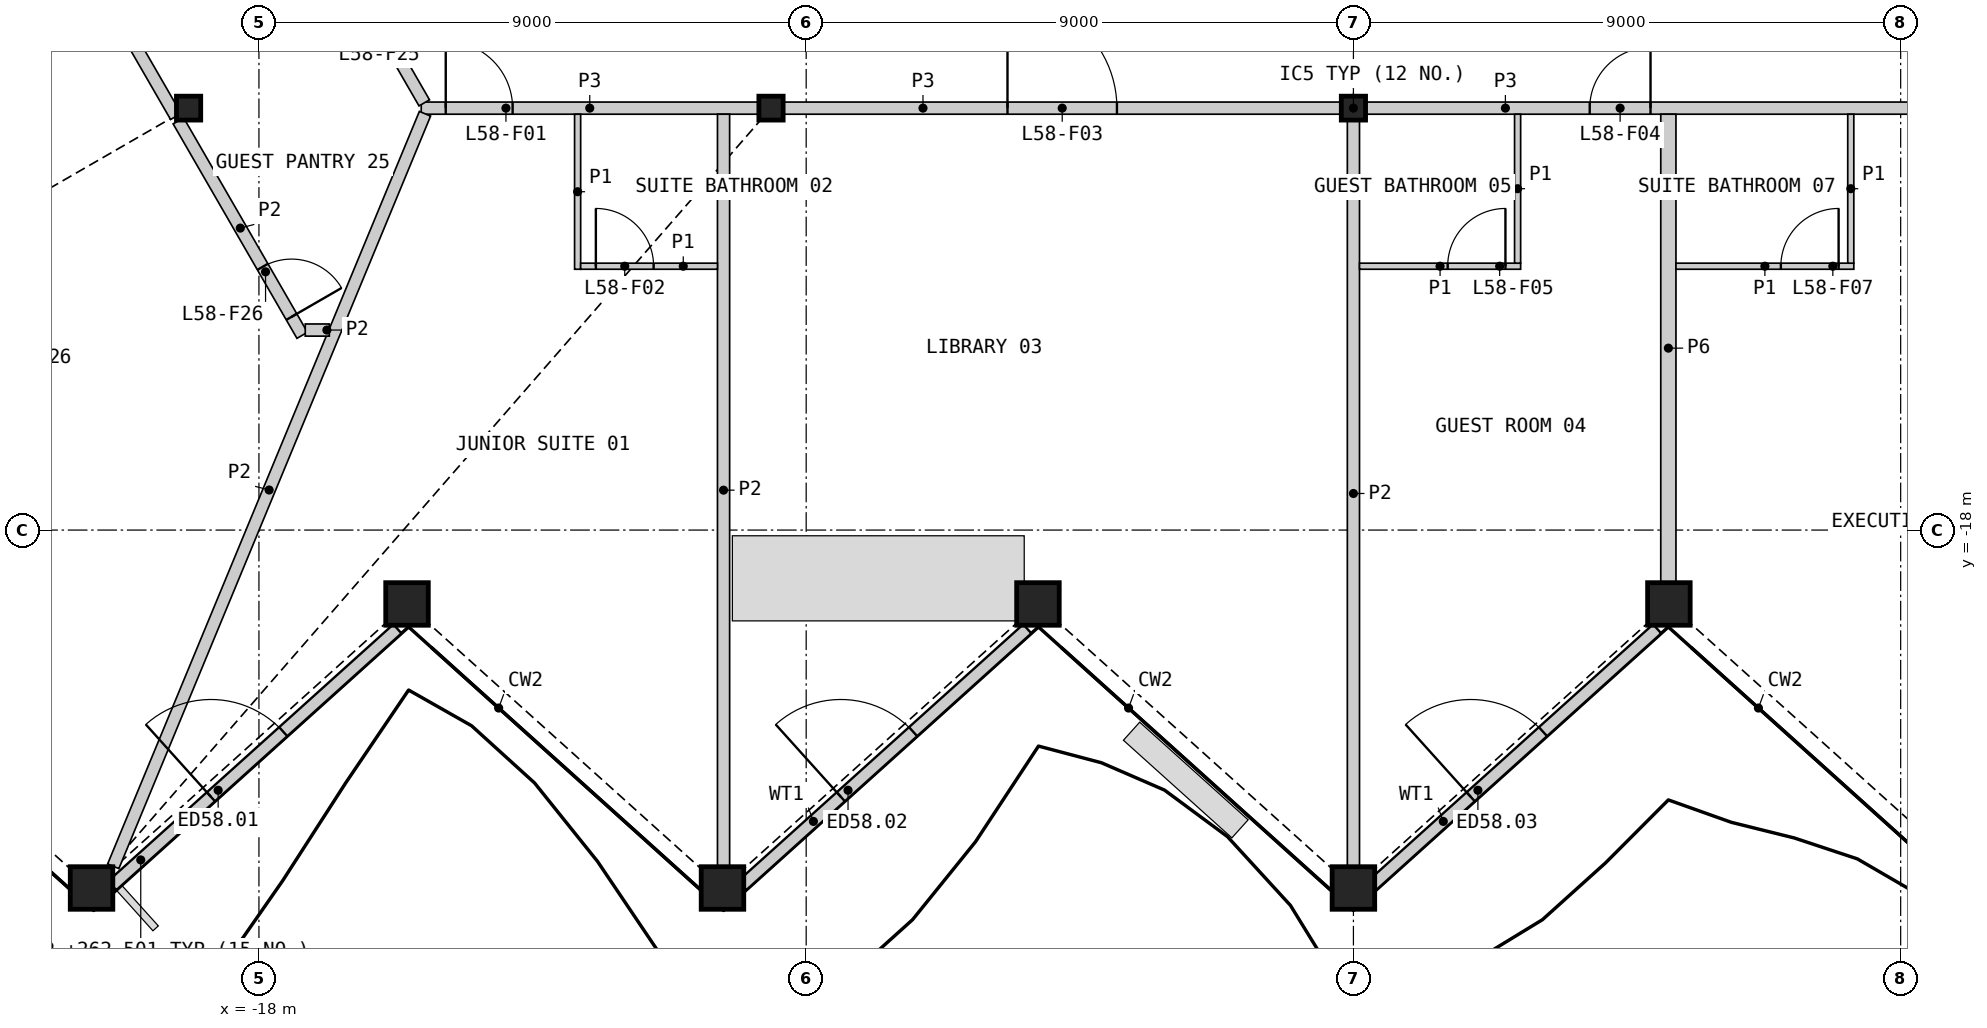
"""IFC4 building model, lengths in metres.
Left out: names, types, materials, properties, quantities, classifications, styles, units other than length and angle.
Written with IfcOpenShell. Run it as: python <this file> out.ifc"""

import sys

from ifc_helpers import new_model, si_unit, direction, frame, frame_2d, origin, origin_2d, place, context, subcontext, project, spatial, rectangle, hollow_rectangle, i_section, extrude, element, fill, save


model = new_model("IFC4")
c1 = context("Model", 3, precision=1e-05, world=origin(), true_north=direction((0.0, 1.0)))
c2 = subcontext(c1, "Body", "Model", "MODEL_VIEW")
j1 = project(units=[si_unit("LENGTHUNIT", "METRE"), si_unit("PLANEANGLEUNIT", "RADIAN")], contexts=[c1])
p1 = place(None, origin())
s1 = spatial("IfcSite", under=j1, at=p1, CompositionType="ELEMENT")
p2 = place(p1, origin())
s2 = spatial("IfcBuilding", under=s1, at=p2, CompositionType="ELEMENT")
p3 = place(p2, frame((0.0, 0.0, 259.8)))
s3 = spatial("IfcBuildingStorey", under=s2, at=p3, CompositionType="ELEMENT", Elevation=259.8)
for number, where, z_axis, x_axis in (
    (1, (-20.753, -23.887, 0.0), (0.0, 0.0, 1.0), (1.0, 0.0, 0.0)),
    (2, (-15.565, -19.215, 0.0), (0.0, 0.0, 1.0), (1.0, 0.0, 0.0)),
    (3, (-10.376, -23.887, 0.0), (0.0, 0.0, 1.0), (1.0, 0.0, 0.0)),
    (4, (-5.188, -19.215, 0.0), (0.0, 0.0, 1.0), (1.0, 0.0, 0.0)),
    (5, (0.0, -23.887, 0.0), (0.0, 0.0, 1.0), (1.0, 0.0, 0.0)),
    (6, (5.188, -19.215, 0.0), (0.0, 0.0, 1.0), (1.0, 0.0, 0.0)),
):
    element("IfcColumn", number, at=place(p3, frame(where, z_axis=z_axis, x_axis=x_axis)), inside=s3, PredefinedType="COLUMN", context=c2, shape_type="SweptSolid", body=[
        extrude(hollow_rectangle(XDim=0.7, YDim=0.7, WallThickness=0.045, at=origin_2d()), origin(), (0.0, 0.0, 1.0), 3.6),
    ])
for number, where, z_axis, x_axis in (
    (7, (-19.157, -11.06, 0.0), (0.0, 0.0, 1.0), (1.0, 0.0, 0.0)),
    (8, (-9.578, -11.06, 0.0), (0.0, 0.0, 1.0), (1.0, 0.0, 0.0)),
    (9, (0.0, -11.06, 0.0), (0.0, 0.0, 1.0), (1.0, 0.0, 0.0)),
):
    element("IfcColumn", number, at=place(p3, frame(where, z_axis=z_axis, x_axis=x_axis)), inside=s3, PredefinedType="COLUMN", context=c2, shape_type="SweptSolid", body=[
        extrude(i_section(OverallWidth=0.399, OverallDepth=0.393, WebThickness=0.023, FlangeThickness=0.037, at=origin_2d()), origin(), (0.0, 0.0, 1.0), 3.6),
    ])
p4 = place(p3, frame((-20.413, -23.848, 0.0), z_axis=(0.0, 0.0, 1.0), x_axis=(0.74314024121, 0.669135697668, 0.0)))
e10 = element("IfcWall", 10, at=p4, inside=s3, PredefinedType="SOLIDWALL", context=c2, shape_type="SweptSolid", body=[
    extrude(rectangle(XDim=6.311, YDim=0.2, at=frame_2d((3.156, 0.0))), origin(), (0.0, 0.0, 1.0), 2.701),
])
p5 = place(p4, frame((2.184, 0.0, 0.0)))
e11 = element("IfcOpeningElement", 11, at=p5, cuts=e10, PredefinedType="OPENING", context=c2, shape_type="SweptSolid", body=[
    extrude(rectangle(XDim=1.6, YDim=2.4, at=frame_2d((0.8, 1.2))), frame((0.0, 0.11, 0.0), z_axis=(0.0, -1.0, 0.0), x_axis=(1.0, 0.0, 0.0)), (0.0, 0.0, 1.0), 0.22),
])
p6 = place(p3, frame((-10.054, -23.848, 0.0), z_axis=(0.0, 0.0, 1.0), x_axis=(0.74314024121, 0.669135697668, 0.0)))
e12 = element("IfcWall", 12, at=p6, inside=s3, PredefinedType="SOLIDWALL", context=c2, shape_type="SweptSolid", body=[
    extrude(rectangle(XDim=6.311, YDim=0.2, at=frame_2d((3.156, 0.0))), origin(), (0.0, 0.0, 1.0), 2.701),
])
p7 = place(p6, frame((2.184, 0.0, 0.0)))
e13 = element("IfcOpeningElement", 13, at=p7, cuts=e12, PredefinedType="OPENING", context=c2, shape_type="SweptSolid", body=[
    extrude(rectangle(XDim=1.6, YDim=2.4, at=frame_2d((0.8, 1.2))), frame((0.0, 0.11, 0.0), z_axis=(0.0, -1.0, 0.0), x_axis=(1.0, 0.0, 0.0)), (0.0, 0.0, 1.0), 0.22),
])
p8 = place(p3, frame((0.305, -23.848, 0.0), z_axis=(0.0, 0.0, 1.0), x_axis=(0.74314024121, 0.669135697668, 0.0)))
e14 = element("IfcWall", 14, at=p8, inside=s3, PredefinedType="SOLIDWALL", context=c2, shape_type="SweptSolid", body=[
    extrude(rectangle(XDim=6.311, YDim=0.2, at=frame_2d((3.156, 0.0))), origin(), (0.0, 0.0, 1.0), 2.701),
])
p9 = place(p8, frame((2.184, 0.0, 0.0)))
e15 = element("IfcOpeningElement", 15, at=p9, cuts=e14, PredefinedType="OPENING", context=c2, shape_type="SweptSolid", body=[
    extrude(rectangle(XDim=1.6, YDim=2.4, at=frame_2d((0.8, 1.2))), frame((0.0, 0.11, 0.0), z_axis=(0.0, -1.0, 0.0), x_axis=(1.0, 0.0, 0.0)), (0.0, 0.0, 1.0), 0.22),
])
p10 = place(p3, frame((-9.369, -11.06, 0.0), z_axis=(0.0, 0.0, 1.0), x_axis=(1.0, 0.0, 0.0)))
e16 = element("IfcWall", 16, at=p10, inside=s3, PredefinedType="PARTITIONING", context=c2, shape_type="SweptSolid", body=[
    extrude(rectangle(XDim=9.159, YDim=0.2, at=frame_2d((4.58, 0.0))), origin(), (0.0, 0.0, 1.0), 3.25),
])
p11 = place(p10, frame((3.68, 0.0, 0.0)))
e17 = element("IfcOpeningElement", 17, at=p11, cuts=e16, PredefinedType="OPENING", context=c2, shape_type="SweptSolid", body=[
    extrude(rectangle(XDim=1.8, YDim=2.1, at=frame_2d((0.9, 1.05))), frame((0.0, 0.11, 0.0), z_axis=(0.0, -1.0, 0.0), x_axis=(1.0, 0.0, 0.0)), (0.0, 0.0, 1.0), 0.22),
])
p12 = place(p3, frame((0.209, -11.06, 0.0), z_axis=(0.0, 0.0, 1.0), x_axis=(1.0, 0.0, 0.0)))
e18 = element("IfcWall", 18, at=p12, inside=s3, PredefinedType="PARTITIONING", context=c2, shape_type="SweptSolid", body=[
    extrude(rectangle(XDim=9.159, YDim=0.2, at=frame_2d((4.58, 0.0))), origin(), (0.0, 0.0, 1.0), 3.25),
])
p13 = place(p12, frame((3.677, 0.0, 0.0)))
e19 = element("IfcOpeningElement", 19, at=p13, cuts=e18, PredefinedType="OPENING", context=c2, shape_type="SweptSolid", body=[
    extrude(rectangle(XDim=1.0, YDim=2.1, at=frame_2d((0.5, 1.05))), frame((0.0, 0.11, 0.0), z_axis=(0.0, -1.0, 0.0), x_axis=(1.0, 0.0, 0.0)), (0.0, 0.0, 1.0), 0.22),
])
p14 = place(p3, frame((5.179, -18.855, 0.0), z_axis=(0.0, 0.0, 1.0), x_axis=(0.0, 1.0, 0.0)))
e20 = element("IfcWall", 20, at=p14, inside=s3, PredefinedType="PARTITIONING", context=c2, shape_type="SweptSolid", body=[
    extrude(rectangle(XDim=7.695, YDim=0.25, at=frame_2d((3.848, 0.0))), origin(), (0.0, 0.0, 1.0), 2.404),
])
p15 = place(p3, frame((-15.331, -11.06, 0.0), z_axis=(0.0, 0.0, 1.0), x_axis=(1.0, 0.0, 0.0)))
e21 = element("IfcWall", 21, at=p15, inside=s3, PredefinedType="PARTITIONING", context=c2, shape_type="SweptSolid", body=[
    extrude(rectangle(XDim=5.543, YDim=0.2, at=frame_2d((2.771, 0.0))), origin(), (0.0, 0.0, 1.0), 3.25),
])
p16 = place(p15, frame((0.403, 0.0, 0.0)))
e22 = element("IfcOpeningElement", 22, at=p16, cuts=e21, PredefinedType="OPENING", context=c2, shape_type="SweptSolid", body=[
    extrude(rectangle(XDim=1.1, YDim=2.1, at=frame_2d((0.55, 1.05))), frame((0.0, 0.11, 0.0), z_axis=(0.0, -1.0, 0.0), x_axis=(1.0, 0.0, 0.0)), (0.0, 0.0, 1.0), 0.22),
])
p17 = place(p3, frame((-17.144, -7.747, 0.0), z_axis=(0.0, 0.0, 1.0), x_axis=(0.499958791762, -0.866049194065, 0.0)))
e23 = element("IfcWall", 23, at=p17, inside=s3, PredefinedType="PARTITIONING", context=c2, shape_type="SweptSolid", body=[
    extrude(rectangle(XDim=3.726, YDim=0.2, at=frame_2d((1.863, 0.0))), origin(), (0.0, 0.0, 1.0), 3.25),
])
p18 = place(p17, frame((1.388, 0.0, 0.0)))
e24 = element("IfcOpeningElement", 24, at=p18, cuts=e23, PredefinedType="OPENING", context=c2, shape_type="SweptSolid", body=[
    extrude(rectangle(XDim=0.95, YDim=2.1, at=frame_2d((0.475, 1.05))), frame((0.0, 0.11, 0.0), z_axis=(0.0, -1.0, 0.0), x_axis=(1.0, 0.0, 0.0)), (0.0, 0.0, 1.0), 0.22),
])
p19 = place(p3, frame((-20.396, -23.53, 0.0), z_axis=(0.0, 0.0, 1.0), x_axis=(0.382692998932, 0.923875569851, 0.0)))
e25 = element("IfcWall", 25, at=p19, inside=s3, PredefinedType="PARTITIONING", context=c2, shape_type="SweptSolid", body=[
    extrude(rectangle(XDim=13.397, YDim=0.2, at=frame_2d((6.698, 0.0))), origin(), (0.0, 0.0, 1.0), 2.404),
])
p20 = place(p3, frame((-10.359, -23.527, 0.0), z_axis=(0.0, 0.0, 1.0), x_axis=(0.0, 1.0, 0.0)))
e26 = element("IfcWall", 26, at=p20, inside=s3, PredefinedType="PARTITIONING", context=c2, shape_type="SweptSolid", body=[
    extrude(rectangle(XDim=12.366, YDim=0.2, at=frame_2d((6.183, 0.0))), origin(), (0.0, 0.0, 1.0), 2.404),
])
p21 = place(p3, frame((0.0, -23.527, 0.0), z_axis=(0.0, 0.0, 1.0), x_axis=(0.0, 1.0, 0.0)))
e27 = element("IfcWall", 27, at=p21, inside=s3, PredefinedType="PARTITIONING", context=c2, shape_type="SweptSolid", body=[
    extrude(rectangle(XDim=12.257, YDim=0.2, at=frame_2d((6.128, 0.0))), origin(), (0.0, 0.0, 1.0), 2.404),
])
p22 = place(p3, frame((-21.458, -7.574, 0.0), z_axis=(0.0, 0.0, 1.0), x_axis=(0.499973304129, -0.866040816104, 0.0)))
e28 = element("IfcWall", 28, at=p22, inside=s3, PredefinedType="PARTITIONING", context=c2, shape_type="SweptSolid", body=[
    extrude(rectangle(XDim=4.184, YDim=0.2, at=frame_2d((2.092, 0.0))), origin(), (0.0, 0.0, 1.0), 2.404),
])
p23 = place(p3, frame((-19.325, -11.27, 0.0), z_axis=(0.0, 0.0, 1.0), x_axis=(0.500000928893, -0.866024867487, 0.0)))
e29 = element("IfcWall", 29, at=p23, inside=s3, PredefinedType="PARTITIONING", context=c2, shape_type="SweptSolid", body=[
    extrude(rectangle(XDim=4.073, YDim=0.2, at=frame_2d((2.036, 0.0))), origin(), (0.0, 0.0, 1.0), 2.404),
])
p24 = place(p23, frame((2.772, 0.0, 0.0)))
e30 = element("IfcOpeningElement", 30, at=p24, cuts=e29, PredefinedType="OPENING", context=c2, shape_type="SweptSolid", body=[
    extrude(rectangle(XDim=0.95, YDim=2.1, at=frame_2d((0.475, 1.05))), frame((0.0, 0.11, 0.0), z_axis=(0.0, -1.0, 0.0), x_axis=(1.0, 0.0, 0.0)), (0.0, 0.0, 1.0), 0.22),
])
p25 = place(p3, frame((-17.238, -14.71, 0.0), z_axis=(0.0, 0.0, 1.0), x_axis=(1.0, 0.0, 0.0)))
e31 = element("IfcWall", 31, at=p25, inside=s3, PredefinedType="PARTITIONING", context=c2, shape_type="SweptSolid", body=[
    extrude(rectangle(XDim=0.396, YDim=0.2, at=frame_2d((0.198, 0.0))), origin(), (0.0, 0.0, 1.0), 2.404),
])
p26 = place(p3, frame((5.304, -13.66, 0.0), z_axis=(0.0, 0.0, 1.0), x_axis=(1.0, 0.0, 0.0)))
e32 = element("IfcWall", 32, at=p26, inside=s3, PredefinedType="PARTITIONING", context=c2, shape_type="SweptSolid", body=[
    extrude(rectangle(XDim=2.925, YDim=0.1, at=frame_2d((1.462, 0.0))), origin(), (0.0, 0.0, 1.0), 2.404),
])
p27 = place(p26, frame((1.725, 0.0, 0.0)))
e33 = element("IfcOpeningElement", 33, at=p27, cuts=e32, PredefinedType="OPENING", context=c2, shape_type="SweptSolid", body=[
    extrude(rectangle(XDim=0.95, YDim=2.1, at=frame_2d((0.475, 1.05))), frame((0.0, 0.06, 0.0), z_axis=(0.0, -1.0, 0.0), x_axis=(1.0, 0.0, 0.0)), (0.0, 0.0, 1.0), 0.12),
])
p28 = place(p3, frame((0.1, -13.66, 0.0), z_axis=(0.0, 0.0, 1.0), x_axis=(1.0, 0.0, 0.0)))
e34 = element("IfcWall", 34, at=p28, inside=s3, PredefinedType="PARTITIONING", context=c2, shape_type="SweptSolid", body=[
    extrude(rectangle(XDim=2.65, YDim=0.1, at=frame_2d((1.325, 0.0))), origin(), (0.0, 0.0, 1.0), 2.404),
])
p29 = place(p28, frame((1.45, 0.0, 0.0)))
e35 = element("IfcOpeningElement", 35, at=p29, cuts=e34, PredefinedType="OPENING", context=c2, shape_type="SweptSolid", body=[
    extrude(rectangle(XDim=0.95, YDim=2.1, at=frame_2d((0.475, 1.05))), frame((0.0, 0.06, 0.0), z_axis=(0.0, -1.0, 0.0), x_axis=(1.0, 0.0, 0.0)), (0.0, 0.0, 1.0), 0.12),
])
p30 = place(p3, frame((-12.759, -13.71, 0.0), z_axis=(0.0, 0.0, 1.0), x_axis=(0.0, 1.0, 0.0)))
e36 = element("IfcWall", 36, at=p30, inside=s3, PredefinedType="PARTITIONING", context=c2, shape_type="SweptSolid", body=[
    extrude(rectangle(XDim=2.55, YDim=0.1, at=frame_2d((1.275, 0.0))), origin(), (0.0, 0.0, 1.0), 2.404),
])
for number, where, z_axis, x_axis in (
    (37, (2.7, -13.61, 0.0), (0.0, 0.0, 1.0), (0.0, 1.0, 0.0)),
    (38, (8.179, -13.61, 0.0), (0.0, 0.0, 1.0), (0.0, 1.0, 0.0)),
):
    element("IfcWall", number, at=place(p3, frame(where, z_axis=z_axis, x_axis=x_axis)), inside=s3, PredefinedType="PARTITIONING", context=c2, shape_type="SweptSolid", body=[
        extrude(rectangle(XDim=2.45, YDim=0.1, at=frame_2d((1.225, 0.0))), origin(), (0.0, 0.0, 1.0), 2.404),
    ])
p31 = place(p3, frame((-12.709, -13.66, 0.0), z_axis=(0.0, 0.0, 1.0), x_axis=(1.0, 0.0, 0.0)))
e39 = element("IfcWall", 39, at=p31, inside=s3, PredefinedType="PARTITIONING", context=c2, shape_type="SweptSolid", body=[
    extrude(rectangle(XDim=2.25, YDim=0.1, at=frame_2d((1.125, 0.0))), origin(), (0.0, 0.0, 1.0), 2.404),
])
p32 = place(p31, frame((0.25, 0.0, 0.0)))
e40 = element("IfcOpeningElement", 40, at=p32, cuts=e39, PredefinedType="OPENING", context=c2, shape_type="SweptSolid", body=[
    extrude(rectangle(XDim=0.95, YDim=2.1, at=frame_2d((0.475, 1.05))), frame((0.0, 0.06, 0.0), z_axis=(0.0, -1.0, 0.0), x_axis=(1.0, 0.0, 0.0)), (0.0, 0.0, 1.0), 0.12),
])
p33 = place(p5, origin())
e41 = element("IfcDoor", 41, at=p33, inside=s3, OperationType="DOUBLE_DOOR_SINGLE_SWING", PredefinedType="DOOR", context=c2, shape_type="SweptSolid", body=[
    extrude(rectangle(XDim=1.6, YDim=2.4, at=frame_2d((0.8, 1.2))), frame((0.0, 0.025, 0.0), z_axis=(0.0, -1.0, 0.0), x_axis=(1.0, 0.0, 0.0)), (0.0, 0.0, 1.0), 0.05),
])
fill(e11, e41)
p34 = place(p7, origin())
e42 = element("IfcDoor", 42, at=p34, inside=s3, OperationType="DOUBLE_DOOR_SINGLE_SWING", PredefinedType="DOOR", context=c2, shape_type="SweptSolid", body=[
    extrude(rectangle(XDim=1.6, YDim=2.4, at=frame_2d((0.8, 1.2))), frame((0.0, 0.025, 0.0), z_axis=(0.0, -1.0, 0.0), x_axis=(1.0, 0.0, 0.0)), (0.0, 0.0, 1.0), 0.05),
])
fill(e13, e42)
p35 = place(p9, origin())
e43 = element("IfcDoor", 43, at=p35, inside=s3, OperationType="DOUBLE_DOOR_SINGLE_SWING", PredefinedType="DOOR", context=c2, shape_type="SweptSolid", body=[
    extrude(rectangle(XDim=1.6, YDim=2.4, at=frame_2d((0.8, 1.2))), frame((0.0, 0.025, 0.0), z_axis=(0.0, -1.0, 0.0), x_axis=(1.0, 0.0, 0.0)), (0.0, 0.0, 1.0), 0.05),
])
fill(e15, e43)
p36 = place(p16, origin())
e44 = element("IfcDoor", 44, at=p36, inside=s3, OperationType="SINGLE_SWING_LEFT", PredefinedType="DOOR", context=c2, shape_type="SweptSolid", body=[
    extrude(rectangle(XDim=1.1, YDim=2.1, at=frame_2d((0.55, 1.05))), frame((0.0, 0.025, 0.0), z_axis=(0.0, -1.0, 0.0), x_axis=(1.0, 0.0, 0.0)), (0.0, 0.0, 1.0), 0.05),
])
fill(e22, e44)
p37 = place(p32, origin())
e45 = element("IfcDoor", 45, at=p37, inside=s3, OperationType="SINGLE_SWING_LEFT", PredefinedType="DOOR", context=c2, shape_type="SweptSolid", body=[
    extrude(rectangle(XDim=0.95, YDim=2.1, at=frame_2d((0.475, 1.05))), frame((0.0, 0.025, 0.0), z_axis=(0.0, -1.0, 0.0), x_axis=(1.0, 0.0, 0.0)), (0.0, 0.0, 1.0), 0.05),
])
fill(e40, e45)
p38 = place(p11, origin())
e46 = element("IfcDoor", 46, at=p38, inside=s3, OperationType="DOUBLE_DOOR_SINGLE_SWING", PredefinedType="DOOR", context=c2, shape_type="SweptSolid", body=[
    extrude(rectangle(XDim=1.8, YDim=2.1, at=frame_2d((0.9, 1.05))), frame((0.0, 0.025, 0.0), z_axis=(0.0, -1.0, 0.0), x_axis=(1.0, 0.0, 0.0)), (0.0, 0.0, 1.0), 0.05),
])
fill(e17, e46)
p39 = place(p13, origin())
e47 = element("IfcDoor", 47, at=p39, inside=s3, OperationType="SINGLE_SWING_RIGHT", PredefinedType="DOOR", context=c2, shape_type="SweptSolid", body=[
    extrude(rectangle(XDim=1.0, YDim=2.1, at=frame_2d((0.5, 1.05))), frame((0.0, 0.025, 0.0), z_axis=(0.0, -1.0, 0.0), x_axis=(1.0, 0.0, 0.0)), (0.0, 0.0, 1.0), 0.05),
])
fill(e19, e47)
p40 = place(p29, origin())
e48 = element("IfcDoor", 48, at=p40, inside=s3, OperationType="SINGLE_SWING_RIGHT", PredefinedType="DOOR", context=c2, shape_type="SweptSolid", body=[
    extrude(rectangle(XDim=0.95, YDim=2.1, at=frame_2d((0.475, 1.05))), frame((0.0, 0.025, 0.0), z_axis=(0.0, -1.0, 0.0), x_axis=(1.0, 0.0, 0.0)), (0.0, 0.0, 1.0), 0.05),
])
fill(e35, e48)
p41 = place(p27, origin())
e49 = element("IfcDoor", 49, at=p41, inside=s3, OperationType="SINGLE_SWING_RIGHT", PredefinedType="DOOR", context=c2, shape_type="SweptSolid", body=[
    extrude(rectangle(XDim=0.95, YDim=2.1, at=frame_2d((0.475, 1.05))), frame((0.0, 0.025, 0.0), z_axis=(0.0, -1.0, 0.0), x_axis=(1.0, 0.0, 0.0)), (0.0, 0.0, 1.0), 0.05),
])
fill(e33, e49)
p42 = place(p24, origin())
e50 = element("IfcDoor", 50, at=p42, inside=s3, OperationType="SINGLE_SWING_RIGHT", PredefinedType="DOOR", context=c2, shape_type="SweptSolid", body=[
    extrude(rectangle(XDim=0.95, YDim=2.1, at=frame_2d((0.475, 1.05))), frame((0.0, 0.025, 0.0), z_axis=(0.0, -1.0, 0.0), x_axis=(1.0, 0.0, 0.0)), (0.0, 0.0, 1.0), 0.05),
])
fill(e30, e50)
save(model, sys.argv[1])
